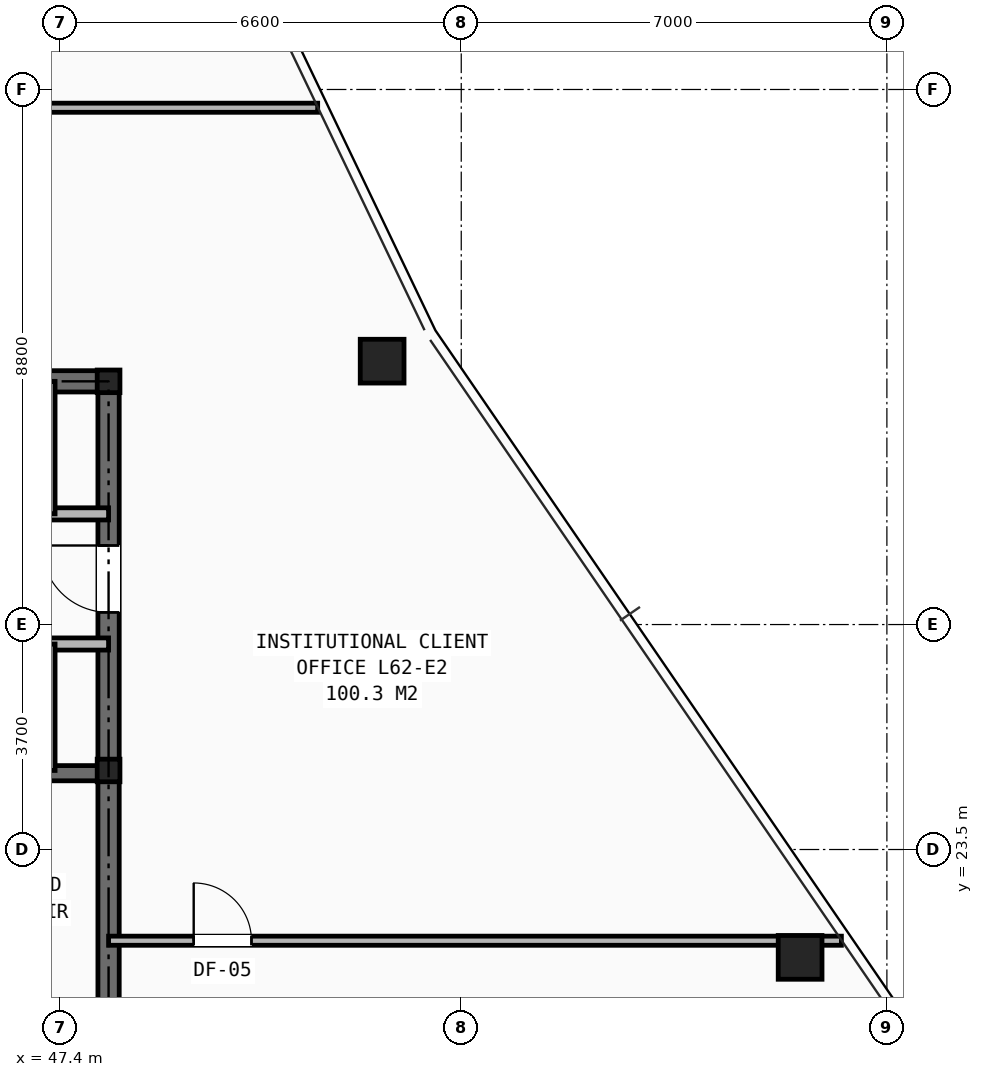
"""IFC4 building model, lengths in metres.
Left out: names, types, materials, properties, quantities, classifications, styles, units other than length and angle.
Written with IfcOpenShell. Run it as: python <this file> out.ifc"""

import sys

from ifc_helpers import new_model, si_unit, direction, frame, frame_2d, origin, origin_2d, place, context, subcontext, project, spatial, rectangle, hollow_rectangle, i_section, extrude, element, fill, save


model = new_model("IFC4")
c1 = context("Model", 3, precision=1e-05, world=origin(), true_north=direction((0.0, 1.0)))
c2 = subcontext(c1, "Body", "Model", "MODEL_VIEW")
j1 = project(units=[si_unit("LENGTHUNIT", "METRE"), si_unit("PLANEANGLEUNIT", "RADIAN")], contexts=[c1])
p1 = place(None, origin())
s1 = spatial("IfcSite", under=j1, at=p1, CompositionType="ELEMENT")
p2 = place(p1, origin())
s2 = spatial("IfcBuilding", under=s1, at=p2, CompositionType="ELEMENT")
p3 = place(p2, frame((0.0, 0.0, 218.9)))
s3 = spatial("IfcBuildingStorey", under=s2, at=p3, CompositionType="ELEMENT", Elevation=218.9)
for number, where, z_axis, x_axis in (
    (1, (48.2, 24.8, 0.0), (0.0, 0.0, 1.0), (1.0, 0.0, 0.0)),
    (2, (48.2, 31.2, 0.0), (0.0, 0.0, 1.0), (1.0, 0.0, 0.0)),
):
    element("IfcColumn", number, at=place(p3, frame(where, z_axis=z_axis, x_axis=x_axis)), inside=s3, PredefinedType="COLUMN", context=c2, shape_type="SweptSolid", body=[
        extrude(i_section(OverallWidth=0.374, OverallDepth=0.372, WebThickness=0.016, FlangeThickness=0.026, at=origin_2d()), origin(), (0.0, 0.0, 1.0), 3.5),
    ])
for number, where, z_axis, x_axis in (
    (3, (59.573, 21.726, 0.0), (0.0, 0.0, 1.0), (1.0, 0.0, 0.0)),
    (4, (52.699, 31.532, 0.0), (0.0, 0.0, 1.0), (1.0, 0.0, 0.0)),
):
    element("IfcColumn", number, at=place(p3, frame(where, z_axis=z_axis, x_axis=x_axis)), inside=s3, PredefinedType="COLUMN", context=c2, shape_type="SweptSolid", body=[
        extrude(hollow_rectangle(XDim=0.72, YDim=0.72, WallThickness=0.05, at=origin_2d()), origin(), (0.0, 0.0, 1.0), 3.5),
    ])
p4 = place(p3, frame((31.8, 31.2, 0.0), z_axis=(0.0, 0.0, 1.0), x_axis=(1.0, 0.0, 0.0)))
e5 = element("IfcWall", 5, at=p4, inside=s3, PredefinedType="SHEAR", context=c2, shape_type="SweptSolid", body=[
    extrude(rectangle(XDim=16.4, YDim=0.35, at=frame_2d((8.2, 0.0))), origin(), (0.0, 0.0, 1.0), 3.25),
])
p5 = place(p3, frame((48.2, 16.4, 0.0), z_axis=(0.0, 0.0, 1.0), x_axis=(0.0, 1.0, 0.0)))
e6 = element("IfcWall", 6, at=p5, inside=s3, PredefinedType="SHEAR", context=c2, shape_type="SweptSolid", body=[
    extrude(rectangle(XDim=14.8, YDim=0.35, at=frame_2d((7.4, 0.0))), origin(), (0.0, 0.0, 1.0), 3.25),
])
p6 = place(p5, frame((11.0, 0.0, 0.0)))
e7 = element("IfcOpeningElement", 7, at=p6, cuts=e6, PredefinedType="OPENING", context=c2, shape_type="SweptSolid", body=[
    extrude(rectangle(XDim=1.1, YDim=2.15, at=frame_2d((0.55, 1.075))), frame((0.0, 0.185, 0.0), z_axis=(0.0, -1.0, 0.0), x_axis=(1.0, 0.0, 0.0)), (0.0, 0.0, 1.0), 0.37),
])
p7 = place(p3, frame((44.955, 24.755, 0.0), z_axis=(0.0, 0.0, 1.0), x_axis=(1.0, 0.0, 0.0)))
e8 = element("IfcWall", 8, at=p7, inside=s3, PredefinedType="SHEAR", context=c2, shape_type="SweptSolid", body=[
    extrude(rectangle(XDim=3.245, YDim=0.25, at=frame_2d((1.623, 0.0))), origin(), (0.0, 0.0, 1.0), 3.25),
])
p8 = place(p3, frame((31.8, 29.02, 0.0), z_axis=(0.0, 0.0, 1.0), x_axis=(1.0, 0.0, 0.0)))
e9 = element("IfcWall", 9, at=p8, inside=s3, PredefinedType="SOLIDWALL", context=c2, shape_type="SweptSolid", body=[
    extrude(rectangle(XDim=16.4, YDim=0.2, at=frame_2d((8.2, 0.0))), origin(), (0.0, 0.0, 1.0), 2.705),
])
p9 = place(p8, frame((0.55, 0.0, 0.0)))
e10 = element("IfcOpeningElement", 10, at=p9, cuts=e9, PredefinedType="OPENING", context=c2, shape_type="SweptSolid", body=[
    extrude(rectangle(XDim=0.85, YDim=2.05, at=frame_2d((0.425, 1.025))), frame((0.0, 0.11, 0.0), z_axis=(0.0, -1.0, 0.0), x_axis=(1.0, 0.0, 0.0)), (0.0, 0.0, 1.0), 0.22),
])
p10 = place(p8, frame((5.94, 0.0, 0.0)))
e11 = element("IfcOpeningElement", 11, at=p10, cuts=e9, PredefinedType="OPENING", context=c2, shape_type="SweptSolid", body=[
    extrude(rectangle(XDim=0.9, YDim=2.1, at=frame_2d((0.45, 1.05))), frame((0.0, 0.11, 0.0), z_axis=(0.0, -1.0, 0.0), x_axis=(1.0, 0.0, 0.0)), (0.0, 0.0, 1.0), 0.22),
])
p11 = place(p8, frame((11.41, 0.0, 0.0)))
e12 = element("IfcOpeningElement", 12, at=p11, cuts=e9, PredefinedType="OPENING", context=c2, shape_type="SweptSolid", body=[
    extrude(rectangle(XDim=1.1, YDim=2.15, at=frame_2d((0.55, 1.075))), frame((0.0, 0.11, 0.0), z_axis=(0.0, -1.0, 0.0), x_axis=(1.0, 0.0, 0.0)), (0.0, 0.0, 1.0), 0.22),
])
p12 = place(p8, frame((13.73, 0.0, 0.0)))
e13 = element("IfcOpeningElement", 13, at=p12, cuts=e9, PredefinedType="OPENING", context=c2, shape_type="SweptSolid", body=[
    extrude(rectangle(XDim=1.1, YDim=2.15, at=frame_2d((0.55, 1.075))), frame((0.0, 0.11, 0.0), z_axis=(0.0, -1.0, 0.0), x_axis=(1.0, 0.0, 0.0)), (0.0, 0.0, 1.0), 0.22),
])
p13 = place(p3, frame((31.8, 26.88, 0.0), z_axis=(0.0, 0.0, 1.0), x_axis=(1.0, 0.0, 0.0)))
e14 = element("IfcWall", 14, at=p13, inside=s3, PredefinedType="SOLIDWALL", context=c2, shape_type="SweptSolid", body=[
    extrude(rectangle(XDim=16.4, YDim=0.2, at=frame_2d((8.2, 0.0))), origin(), (0.0, 0.0, 1.0), 2.705),
])
p14 = place(p13, frame((0.55, 0.0, 0.0)))
e15 = element("IfcOpeningElement", 15, at=p14, cuts=e14, PredefinedType="OPENING", context=c2, shape_type="SweptSolid", body=[
    extrude(rectangle(XDim=0.85, YDim=2.05, at=frame_2d((0.425, 1.025))), frame((0.0, 0.11, 0.0), z_axis=(0.0, -1.0, 0.0), x_axis=(1.0, 0.0, 0.0)), (0.0, 0.0, 1.0), 0.22),
])
p15 = place(p13, frame((5.94, 0.0, 0.0)))
e16 = element("IfcOpeningElement", 16, at=p15, cuts=e14, PredefinedType="OPENING", context=c2, shape_type="SweptSolid", body=[
    extrude(rectangle(XDim=0.9, YDim=2.1, at=frame_2d((0.45, 1.05))), frame((0.0, 0.11, 0.0), z_axis=(0.0, -1.0, 0.0), x_axis=(1.0, 0.0, 0.0)), (0.0, 0.0, 1.0), 0.22),
])
p16 = place(p13, frame((11.41, 0.0, 0.0)))
e17 = element("IfcOpeningElement", 17, at=p16, cuts=e14, PredefinedType="OPENING", context=c2, shape_type="SweptSolid", body=[
    extrude(rectangle(XDim=1.1, YDim=2.15, at=frame_2d((0.55, 1.075))), frame((0.0, 0.11, 0.0), z_axis=(0.0, -1.0, 0.0), x_axis=(1.0, 0.0, 0.0)), (0.0, 0.0, 1.0), 0.22),
])
p17 = place(p13, frame((13.73, 0.0, 0.0)))
e18 = element("IfcOpeningElement", 18, at=p17, cuts=e14, PredefinedType="OPENING", context=c2, shape_type="SweptSolid", body=[
    extrude(rectangle(XDim=1.1, YDim=2.15, at=frame_2d((0.55, 1.075))), frame((0.0, 0.11, 0.0), z_axis=(0.0, -1.0, 0.0), x_axis=(1.0, 0.0, 0.0)), (0.0, 0.0, 1.0), 0.22),
])
p18 = place(p3, frame((47.24, 29.02, 0.0), z_axis=(0.0, 0.0, 1.0), x_axis=(0.0, 1.0, 0.0)))
e19 = element("IfcWall", 19, at=p18, inside=s3, PredefinedType="SOLIDWALL", context=c2, shape_type="SweptSolid", body=[
    extrude(rectangle(XDim=2.18, YDim=0.16, at=frame_2d((1.09, 0.0))), origin(), (0.0, 0.0, 1.0), 2.705),
])
p19 = place(p3, frame((47.24, 24.8, 0.0), z_axis=(0.0, 0.0, 1.0), x_axis=(0.0, 1.0, 0.0)))
e20 = element("IfcWall", 20, at=p19, inside=s3, PredefinedType="SOLIDWALL", context=c2, shape_type="SweptSolid", body=[
    extrude(rectangle(XDim=2.08, YDim=0.16, at=frame_2d((1.04, 0.0))), origin(), (0.0, 0.0, 1.0), 3.25),
])
p20 = place(p3, frame((46.8, 35.7, 0.0), z_axis=(0.0, 0.0, 1.0), x_axis=(1.0, 0.0, 0.0)))
e21 = element("IfcWall", 21, at=p20, inside=s3, PredefinedType="PARTITIONING", context=c2, shape_type="SweptSolid", body=[
    extrude(rectangle(XDim=4.839, YDim=0.15, at=frame_2d((2.419, 0.0))), origin(), (0.0, 0.0, 1.0), 2.628),
])
p21 = place(p3, frame((48.2, 22.0, 0.0), z_axis=(0.0, 0.0, 1.0), x_axis=(1.0, 0.0, 0.0)))
e22 = element("IfcWall", 22, at=p21, inside=s3, PredefinedType="PARTITIONING", context=c2, shape_type="SweptSolid", body=[
    extrude(rectangle(XDim=12.052, YDim=0.15, at=frame_2d((6.026, 0.0))), origin(), (0.0, 0.0, 1.0), 2.292),
])
p22 = place(p21, frame((1.4, 0.0, 0.0)))
e23 = element("IfcOpeningElement", 23, at=p22, cuts=e22, PredefinedType="OPENING", context=c2, shape_type="SweptSolid", body=[
    extrude(rectangle(XDim=0.95, YDim=2.1, at=frame_2d((0.475, 1.05))), frame((0.0, 0.085, 0.0), z_axis=(0.0, -1.0, 0.0), x_axis=(1.0, 0.0, 0.0)), (0.0, 0.0, 1.0), 0.17),
])
p23 = place(p6, origin())
e24 = element("IfcDoor", 24, at=p23, inside=s3, OperationType="SINGLE_SWING_RIGHT", PredefinedType="DOOR", context=c2, shape_type="SweptSolid", body=[
    extrude(rectangle(XDim=1.1, YDim=2.15, at=frame_2d((0.55, 1.075))), frame((0.0, 0.025, 0.0), z_axis=(0.0, -1.0, 0.0), x_axis=(1.0, 0.0, 0.0)), (0.0, 0.0, 1.0), 0.05),
])
fill(e7, e24)
p24 = place(p22, origin())
e25 = element("IfcDoor", 25, at=p24, inside=s3, OperationType="SINGLE_SWING_LEFT", PredefinedType="DOOR", context=c2, shape_type="SweptSolid", body=[
    extrude(rectangle(XDim=0.95, YDim=2.1, at=frame_2d((0.475, 1.05))), frame((0.0, 0.025, 0.0), z_axis=(0.0, -1.0, 0.0), x_axis=(1.0, 0.0, 0.0)), (0.0, 0.0, 1.0), 0.05),
])
fill(e23, e25)
save(model, sys.argv[1])
